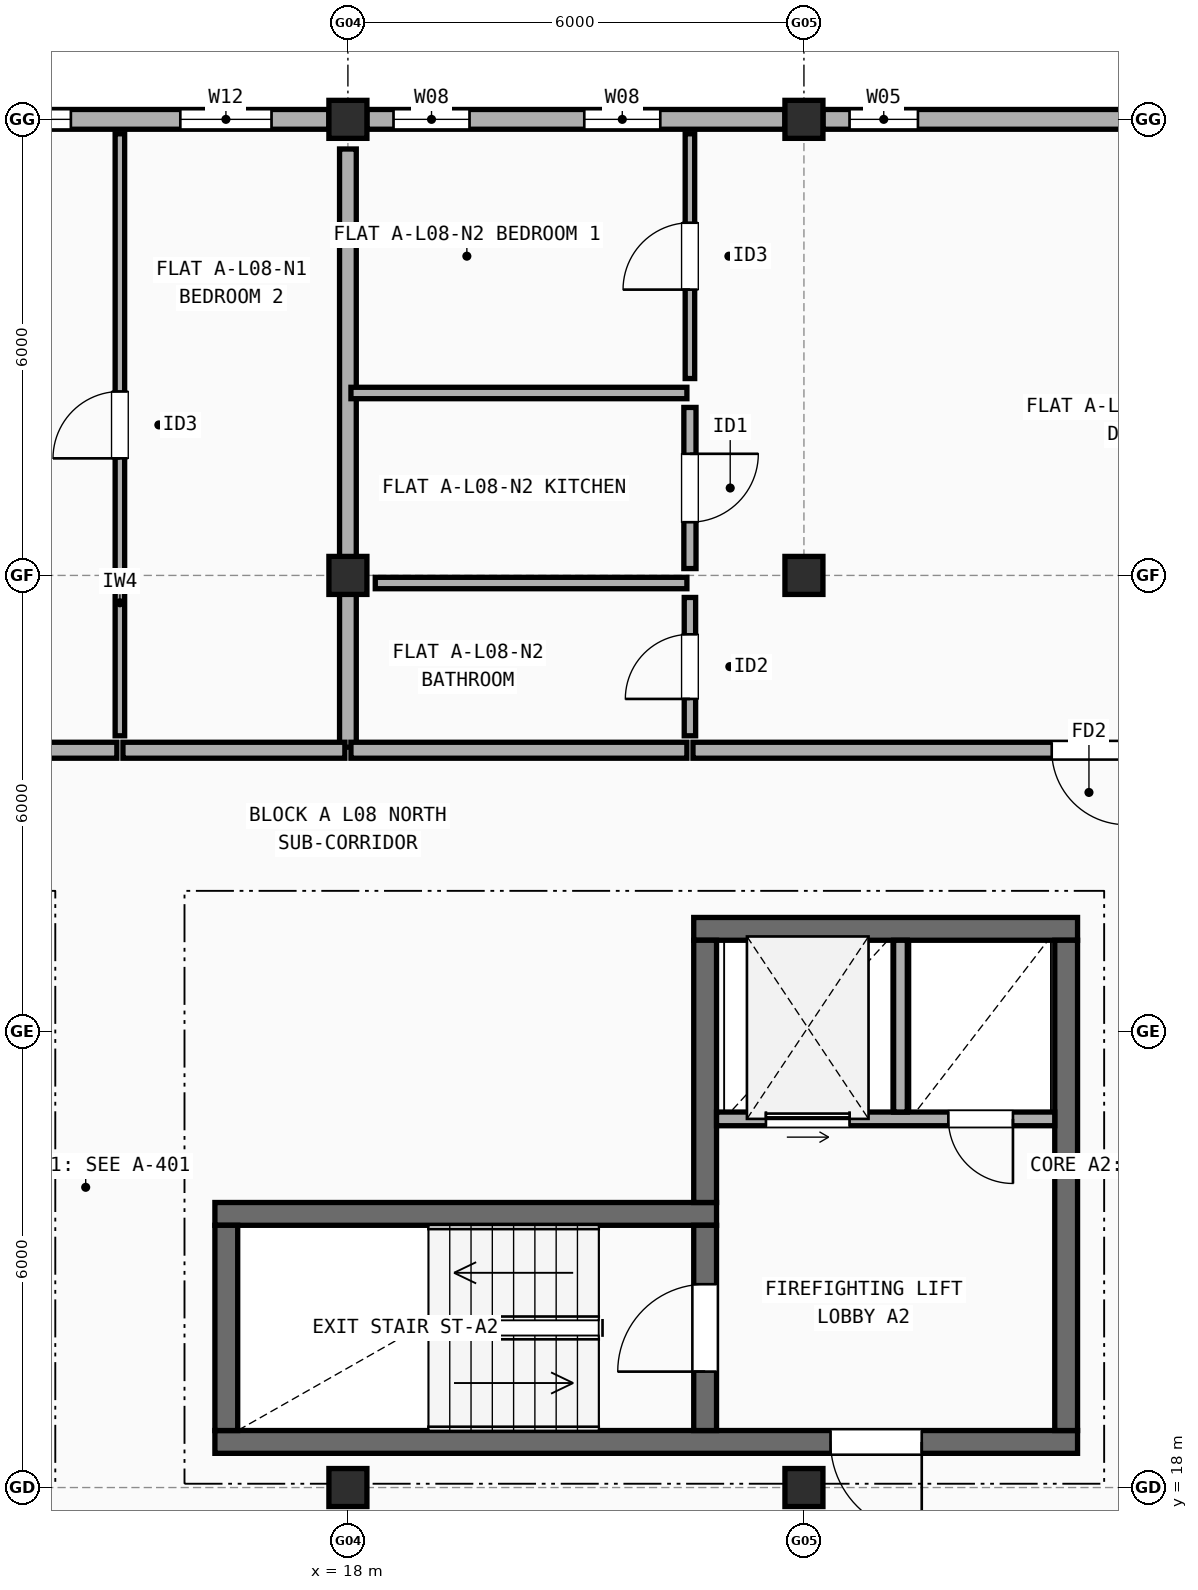
"""IFC4 building model, lengths in metres.
Left out: names, types, materials, properties, quantities, classifications, styles, units other than length and angle.
Written with IfcOpenShell. Run it as: python <this file> out.ifc"""

import sys

from ifc_helpers import new_model, si_unit, direction, frame, frame_2d, origin, origin_2d, place, context, subcontext, project, spatial, rectangle, extrude, element, fill, save


model = new_model("IFC4")
c1 = context("Model", 3, precision=1e-05, world=origin(), true_north=direction((0.0, 1.0)))
c2 = subcontext(c1, "Body", "Model", "MODEL_VIEW")
j1 = project(units=[si_unit("LENGTHUNIT", "METRE"), si_unit("PLANEANGLEUNIT", "RADIAN")], contexts=[c1])
p1 = place(None, origin())
s1 = spatial("IfcSite", under=j1, at=p1, CompositionType="ELEMENT")
p2 = place(p1, origin())
s2 = spatial("IfcBuilding", under=s1, at=p2, CompositionType="ELEMENT")
p3 = place(p2, frame((0.0, 0.0, 26.9)))
s3 = spatial("IfcBuildingStorey", under=s2, at=p3, CompositionType="ELEMENT", Elevation=26.9)
for number, where, z_axis, x_axis in (
    (1, (18.0, 18.0, 0.0), (0.0, 0.0, 1.0), (1.0, 0.0, 0.0)),
    (2, (18.0, 30.0, 0.0), (0.0, 0.0, 1.0), (1.0, 0.0, 0.0)),
    (3, (18.0, 36.0, 0.0), (0.0, 0.0, 1.0), (1.0, 0.0, 0.0)),
    (4, (24.0, 18.0, 0.0), (0.0, 0.0, 1.0), (1.0, 0.0, 0.0)),
    (5, (24.0, 30.0, 0.0), (0.0, 0.0, 1.0), (1.0, 0.0, 0.0)),
    (6, (24.0, 36.0, 0.0), (0.0, 0.0, 1.0), (1.0, 0.0, 0.0)),
):
    element("IfcColumn", number, at=place(p3, frame(where, z_axis=z_axis, x_axis=x_axis)), inside=s3, PredefinedType="COLUMN", context=c2, shape_type="SweptSolid", body=[
        extrude(rectangle(XDim=0.5, YDim=0.5, at=origin_2d()), origin(), (0.0, 0.0, 1.0), 2.98),
    ])
p4 = place(p3, frame((29.775, 36.0, 0.0), z_axis=(0.0, 0.0, 1.0), x_axis=(-1.0, 0.0, 0.0)))
e7 = element("IfcWall", 7, at=p4, inside=s3, PredefinedType="STANDARD", context=c2, shape_type="SweptSolid", body=[
    extrude(rectangle(XDim=5.525, YDim=0.26, at=frame_2d((2.762, 0.0))), origin(), (0.0, 0.0, 1.0), 2.462),
])
p5 = place(p4, frame((0.35, 0.0, 0.9)))
e8 = element("IfcOpeningElement", 8, at=p5, cuts=e7, PredefinedType="OPENING", context=c2, shape_type="SweptSolid", body=[
    extrude(rectangle(XDim=0.9, YDim=1.4, at=frame_2d((0.45, 0.7))), frame((0.0, 0.14, 0.0), z_axis=(0.0, -1.0, 0.0), x_axis=(1.0, 0.0, 0.0)), (0.0, 0.0, 1.0), 0.28),
])
p6 = place(p4, frame((4.275, 0.0, 0.9)))
e9 = element("IfcOpeningElement", 9, at=p6, cuts=e7, PredefinedType="OPENING", context=c2, shape_type="SweptSolid", body=[
    extrude(rectangle(XDim=0.9, YDim=1.4, at=frame_2d((0.45, 0.7))), frame((0.0, 0.14, 0.0), z_axis=(0.0, -1.0, 0.0), x_axis=(1.0, 0.0, 0.0)), (0.0, 0.0, 1.0), 0.28),
])
p7 = place(p3, frame((23.75, 36.0, 0.0), z_axis=(0.0, 0.0, 1.0), x_axis=(-1.0, 0.0, 0.0)))
e10 = element("IfcWall", 10, at=p7, inside=s3, PredefinedType="STANDARD", context=c2, shape_type="SweptSolid", body=[
    extrude(rectangle(XDim=5.5, YDim=0.26, at=frame_2d((2.75, 0.0))), origin(), (0.0, 0.0, 1.0), 2.462),
])
p8 = place(p7, frame((1.64, 0.0, 0.9)))
e11 = element("IfcOpeningElement", 11, at=p8, cuts=e10, PredefinedType="OPENING", context=c2, shape_type="SweptSolid", body=[
    extrude(rectangle(XDim=1.0, YDim=1.4, at=frame_2d((0.5, 0.7))), frame((0.0, 0.14, 0.0), z_axis=(0.0, -1.0, 0.0), x_axis=(1.0, 0.0, 0.0)), (0.0, 0.0, 1.0), 0.28),
])
p9 = place(p7, frame((4.15, 0.0, 0.9)))
e12 = element("IfcOpeningElement", 12, at=p9, cuts=e10, PredefinedType="OPENING", context=c2, shape_type="SweptSolid", body=[
    extrude(rectangle(XDim=1.0, YDim=1.4, at=frame_2d((0.5, 0.7))), frame((0.0, 0.14, 0.0), z_axis=(0.0, -1.0, 0.0), x_axis=(1.0, 0.0, 0.0)), (0.0, 0.0, 1.0), 0.28),
])
p10 = place(p3, frame((17.75, 36.0, 0.0), z_axis=(0.0, 0.0, 1.0), x_axis=(-1.0, 0.0, 0.0)))
e13 = element("IfcWall", 13, at=p10, inside=s3, PredefinedType="STANDARD", context=c2, shape_type="SweptSolid", body=[
    extrude(rectangle(XDim=5.5, YDim=0.26, at=frame_2d((2.75, 0.0))), origin(), (0.0, 0.0, 1.0), 2.462),
])
p11 = place(p10, frame((0.755, 0.0, 0.9)))
e14 = element("IfcOpeningElement", 14, at=p11, cuts=e13, PredefinedType="OPENING", context=c2, shape_type="SweptSolid", body=[
    extrude(rectangle(XDim=1.2, YDim=1.35, at=frame_2d((0.6, 0.675))), frame((0.0, 0.14, 0.0), z_axis=(0.0, -1.0, 0.0), x_axis=(1.0, 0.0, 0.0)), (0.0, 0.0, 1.0), 0.28),
])
p12 = place(p10, frame((3.395, 0.0, 0.9)))
e15 = element("IfcOpeningElement", 15, at=p12, cuts=e13, PredefinedType="OPENING", context=c2, shape_type="SweptSolid", body=[
    extrude(rectangle(XDim=1.5, YDim=1.4, at=frame_2d((0.75, 0.7))), frame((0.0, 0.14, 0.0), z_axis=(0.0, -1.0, 0.0), x_axis=(1.0, 0.0, 0.0)), (0.0, 0.0, 1.0), 0.28),
])
p13 = place(p3, frame((16.25, 18.6, 0.0), z_axis=(0.0, 0.0, 1.0), x_axis=(1.0, 0.0, 0.0)))
e16 = element("IfcWall", 16, at=p13, inside=s3, PredefinedType="SHEAR", context=c2, shape_type="SweptSolid", body=[
    extrude(rectangle(XDim=11.35, YDim=0.3, at=frame_2d((5.675, 0.0))), origin(), (0.0, 0.0, 1.0), 2.98),
])
p14 = place(p13, frame((8.1, 0.0, 0.0)))
e17 = element("IfcOpeningElement", 17, at=p14, cuts=e16, PredefinedType="OPENING", context=c2, shape_type="SweptSolid", body=[
    extrude(rectangle(XDim=1.2, YDim=2.15, at=frame_2d((0.6, 1.075))), frame((0.0, 0.16, 0.0), z_axis=(0.0, -1.0, 0.0), x_axis=(1.0, 0.0, 0.0)), (0.0, 0.0, 1.0), 0.32),
])
p15 = place(p3, frame((22.85, 21.6, 0.0), z_axis=(0.0, 0.0, 1.0), x_axis=(-1.0, 0.0, 0.0)))
e18 = element("IfcWall", 18, at=p15, inside=s3, PredefinedType="SHEAR", context=c2, shape_type="SweptSolid", body=[
    extrude(rectangle(XDim=6.6, YDim=0.3, at=frame_2d((3.3, 0.0))), origin(), (0.0, 0.0, 1.0), 2.98),
])
p16 = place(p3, frame((16.4, 21.45, 0.0), z_axis=(0.0, 0.0, 1.0), x_axis=(0.0, -1.0, 0.0)))
e19 = element("IfcWall", 19, at=p16, inside=s3, PredefinedType="SHEAR", context=c2, shape_type="SweptSolid", body=[
    extrude(rectangle(XDim=2.7, YDim=0.3, at=frame_2d((1.35, 0.0))), origin(), (0.0, 0.0, 1.0), 2.98),
])
p17 = place(p3, frame((22.7, 18.75, 0.0), z_axis=(0.0, 0.0, 1.0), x_axis=(0.0, 1.0, 0.0)))
e20 = element("IfcWall", 20, at=p17, inside=s3, PredefinedType="SHEAR", context=c2, shape_type="SweptSolid", body=[
    extrude(rectangle(XDim=2.7, YDim=0.3, at=frame_2d((1.35, 0.0))), origin(), (0.0, 0.0, 1.0), 2.98),
])
p18 = place(p17, frame((0.775, 0.0, 0.0)))
e21 = element("IfcOpeningElement", 21, at=p18, cuts=e20, PredefinedType="OPENING", context=c2, shape_type="SweptSolid", body=[
    extrude(rectangle(XDim=1.15, YDim=2.15, at=frame_2d((0.575, 1.075))), frame((0.0, 0.16, 0.0), z_axis=(0.0, -1.0, 0.0), x_axis=(1.0, 0.0, 0.0)), (0.0, 0.0, 1.0), 0.32),
])
p19 = place(p3, frame((27.6, 25.35, 0.0), z_axis=(0.0, 0.0, 1.0), x_axis=(-1.0, 0.0, 0.0)))
e22 = element("IfcWall", 22, at=p19, inside=s3, PredefinedType="SHEAR", context=c2, shape_type="SweptSolid", body=[
    extrude(rectangle(XDim=5.05, YDim=0.3, at=frame_2d((2.525, 0.0))), origin(), (0.0, 0.0, 1.0), 2.98),
])
p20 = place(p3, frame((27.45, 18.75, 0.0), z_axis=(0.0, 0.0, 1.0), x_axis=(0.0, 1.0, 0.0)))
e23 = element("IfcWall", 23, at=p20, inside=s3, PredefinedType="SHEAR", context=c2, shape_type="SweptSolid", body=[
    extrude(rectangle(XDim=6.45, YDim=0.3, at=frame_2d((3.225, 0.0))), origin(), (0.0, 0.0, 1.0), 2.98),
])
p21 = place(p3, frame((22.7, 21.75, 0.0), z_axis=(0.0, 0.0, 1.0), x_axis=(0.0, 1.0, 0.0)))
e24 = element("IfcWall", 24, at=p21, inside=s3, PredefinedType="SHEAR", context=c2, shape_type="SweptSolid", body=[
    extrude(rectangle(XDim=3.45, YDim=0.3, at=frame_2d((1.725, 0.0))), origin(), (0.0, 0.0, 1.0), 2.98),
])
p22 = place(p3, frame((22.85, 22.85, 0.0), z_axis=(0.0, 0.0, 1.0), x_axis=(1.0, 0.0, 0.0)))
e25 = element("IfcWall", 25, at=p22, inside=s3, PredefinedType="SOLIDWALL", context=c2, shape_type="SweptSolid", body=[
    extrude(rectangle(XDim=4.45, YDim=0.18, at=frame_2d((2.225, 0.0))), origin(), (0.0, 0.0, 1.0), 2.98),
])
p23 = place(p22, frame((0.65, 0.0, 0.0)))
e26 = element("IfcOpeningElement", 26, at=p23, cuts=e25, PredefinedType="OPENING", context=c2, shape_type="SweptSolid", body=[
    extrude(rectangle(XDim=1.1, YDim=2.15, at=frame_2d((0.55, 1.075))), frame((0.0, 0.1, 0.0), z_axis=(0.0, -1.0, 0.0), x_axis=(1.0, 0.0, 0.0)), (0.0, 0.0, 1.0), 0.2),
])
p24 = place(p22, frame((3.05, 0.0, 0.0)))
e27 = element("IfcOpeningElement", 27, at=p24, cuts=e25, PredefinedType="OPENING", context=c2, shape_type="SweptSolid", body=[
    extrude(rectangle(XDim=0.85, YDim=2.1, at=frame_2d((0.425, 1.05))), frame((0.0, 0.1, 0.0), z_axis=(0.0, -1.0, 0.0), x_axis=(1.0, 0.0, 0.0)), (0.0, 0.0, 1.0), 0.2),
])
p25 = place(p3, frame((25.27, 22.94, 0.0), z_axis=(0.0, 0.0, 1.0), x_axis=(0.0, 1.0, 0.0)))
e28 = element("IfcWall", 28, at=p25, inside=s3, PredefinedType="SOLIDWALL", context=c2, shape_type="SweptSolid", body=[
    extrude(rectangle(XDim=2.26, YDim=0.18, at=frame_2d((1.13, 0.0))), origin(), (0.0, 0.0, 1.0), 2.98),
])
p26 = place(p3, frame((18.0, 27.74, 0.0), z_axis=(0.0, 0.0, 1.0), x_axis=(0.0, 1.0, 0.0)))
e29 = element("IfcWall", 29, at=p26, inside=s3, PredefinedType="SOLIDWALL", context=c2, shape_type="SweptSolid", body=[
    extrude(rectangle(XDim=7.87, YDim=0.22, at=frame_2d((3.935, 0.0))), origin(), (0.0, 0.0, 1.0), 2.458),
])
p27 = place(p3, frame((4.54, 27.7, 0.0), z_axis=(0.0, 0.0, 1.0), x_axis=(1.0, 0.0, 0.0)))
e30 = element("IfcWall", 30, at=p27, inside=s3, PredefinedType="SOLIDWALL", context=c2, shape_type="SweptSolid", body=[
    extrude(rectangle(XDim=10.42, YDim=0.21, at=frame_2d((5.21, 0.0))), origin(), (0.0, 0.0, 1.0), 2.508),
])
p28 = place(p27, frame((4.685, 0.0, 0.0)))
e31 = element("IfcOpeningElement", 31, at=p28, cuts=e30, PredefinedType="OPENING", context=c2, shape_type="SweptSolid", body=[
    extrude(rectangle(XDim=1.05, YDim=2.15, at=frame_2d((0.525, 1.075))), frame((0.0, 0.115, 0.0), z_axis=(0.0, -1.0, 0.0), x_axis=(1.0, 0.0, 0.0)), (0.0, 0.0, 1.0), 0.23),
])
p29 = place(p3, frame((15.04, 27.7, 0.0), z_axis=(0.0, 0.0, 1.0), x_axis=(1.0, 0.0, 0.0)))
e32 = element("IfcWall", 32, at=p29, inside=s3, PredefinedType="SOLIDWALL", context=c2, shape_type="SweptSolid", body=[
    extrude(rectangle(XDim=2.92, YDim=0.21, at=frame_2d((1.46, 0.0))), origin(), (0.0, 0.0, 1.0), 2.98),
])
p30 = place(p3, frame((15.0, 27.89, 0.0), z_axis=(0.0, 0.0, 1.0), x_axis=(0.0, 1.0, 0.0)))
e33 = element("IfcWall", 33, at=p30, inside=s3, PredefinedType="PARTITIONING", context=c2, shape_type="SweptSolid", body=[
    extrude(rectangle(XDim=7.92, YDim=0.125, at=frame_2d((3.96, 0.0))), origin(), (0.0, 0.0, 1.0), 2.462),
])
p31 = place(p30, frame((3.65, 0.0, 0.0)))
e34 = element("IfcOpeningElement", 34, at=p31, cuts=e33, PredefinedType="OPENING", context=c2, shape_type="SweptSolid", body=[
    extrude(rectangle(XDim=0.88, YDim=2.1, at=frame_2d((0.44, 1.05))), frame((0.0, 0.073, 0.0), z_axis=(0.0, -1.0, 0.0), x_axis=(1.0, 0.0, 0.0)), (0.0, 0.0, 1.0), 0.145),
])
p32 = place(p3, frame((18.04, 27.7, 0.0), z_axis=(0.0, 0.0, 1.0), x_axis=(1.0, 0.0, 0.0)))
e35 = element("IfcWall", 35, at=p32, inside=s3, PredefinedType="SOLIDWALL", context=c2, shape_type="SweptSolid", body=[
    extrude(rectangle(XDim=4.42, YDim=0.21, at=frame_2d((2.21, 0.0))), origin(), (0.0, 0.0, 1.0), 2.98),
])
p33 = place(p3, frame((22.54, 27.7, 0.0), z_axis=(0.0, 0.0, 1.0), x_axis=(1.0, 0.0, 0.0)))
e36 = element("IfcWall", 36, at=p33, inside=s3, PredefinedType="SOLIDWALL", context=c2, shape_type="SweptSolid", body=[
    extrude(rectangle(XDim=10.42, YDim=0.21, at=frame_2d((5.21, 0.0))), origin(), (0.0, 0.0, 1.0), 2.462),
])
p34 = place(p33, frame((4.72, 0.0, 0.0)))
e37 = element("IfcOpeningElement", 37, at=p34, cuts=e36, PredefinedType="OPENING", context=c2, shape_type="SweptSolid", body=[
    extrude(rectangle(XDim=0.98, YDim=2.15, at=frame_2d((0.49, 1.075))), frame((0.0, 0.115, 0.0), z_axis=(0.0, -1.0, 0.0), x_axis=(1.0, 0.0, 0.0)), (0.0, 0.0, 1.0), 0.23),
])
p35 = place(p3, frame((22.5, 32.59, 0.0), z_axis=(0.0, 0.0, 1.0), x_axis=(0.0, 1.0, 0.0)))
e38 = element("IfcWall", 38, at=p35, inside=s3, PredefinedType="PARTITIONING", context=c2, shape_type="SweptSolid", body=[
    extrude(rectangle(XDim=3.22, YDim=0.125, at=frame_2d((1.61, 0.0))), origin(), (0.0, 0.0, 1.0), 2.98),
])
p36 = place(p35, frame((1.17, 0.0, 0.0)))
e39 = element("IfcOpeningElement", 39, at=p36, cuts=e38, PredefinedType="OPENING", context=c2, shape_type="SweptSolid", body=[
    extrude(rectangle(XDim=0.88, YDim=2.1, at=frame_2d((0.44, 1.05))), frame((0.0, 0.073, 0.0), z_axis=(0.0, -1.0, 0.0), x_axis=(1.0, 0.0, 0.0)), (0.0, 0.0, 1.0), 0.145),
])
p37 = place(p3, frame((22.5, 30.09, 0.0), z_axis=(0.0, 0.0, 1.0), x_axis=(0.0, 1.0, 0.0)))
e40 = element("IfcWall", 40, at=p37, inside=s3, PredefinedType="PLUMBINGWALL", context=c2, shape_type="SweptSolid", body=[
    extrude(rectangle(XDim=2.12, YDim=0.16, at=frame_2d((1.06, 0.0))), origin(), (0.0, 0.0, 1.0), 2.462),
])
p38 = place(p37, frame((0.61, 0.0, 0.0)))
e41 = element("IfcOpeningElement", 41, at=p38, cuts=e40, PredefinedType="OPENING", context=c2, shape_type="SweptSolid", body=[
    extrude(rectangle(XDim=0.9, YDim=2.1, at=frame_2d((0.45, 1.05))), frame((0.0, 0.09, 0.0), z_axis=(0.0, -1.0, 0.0), x_axis=(1.0, 0.0, 0.0)), (0.0, 0.0, 1.0), 0.18),
])
p39 = place(p3, frame((22.5, 27.89, 0.0), z_axis=(0.0, 0.0, 1.0), x_axis=(0.0, 1.0, 0.0)))
e42 = element("IfcWall", 42, at=p39, inside=s3, PredefinedType="PARTITIONING", context=c2, shape_type="SweptSolid", body=[
    extrude(rectangle(XDim=1.82, YDim=0.15, at=frame_2d((0.91, 0.0))), origin(), (0.0, 0.0, 1.0), 2.98),
])
p40 = place(p39, frame((0.485, 0.0, 0.0)))
e43 = element("IfcOpeningElement", 43, at=p40, cuts=e42, PredefinedType="OPENING", context=c2, shape_type="SweptSolid", body=[
    extrude(rectangle(XDim=0.85, YDim=2.1, at=frame_2d((0.425, 1.05))), frame((0.0, 0.085, 0.0), z_axis=(0.0, -1.0, 0.0), x_axis=(1.0, 0.0, 0.0)), (0.0, 0.0, 1.0), 0.17),
])
p41 = place(p3, frame((18.04, 32.4, 0.0), z_axis=(0.0, 0.0, 1.0), x_axis=(1.0, 0.0, 0.0)))
e44 = element("IfcWall", 44, at=p41, inside=s3, PredefinedType="PARTITIONING", context=c2, shape_type="SweptSolid", body=[
    extrude(rectangle(XDim=4.42, YDim=0.15, at=frame_2d((2.21, 0.0))), origin(), (0.0, 0.0, 1.0), 2.458),
])
p42 = place(p3, frame((18.36, 29.9, 0.0), z_axis=(0.0, 0.0, 1.0), x_axis=(1.0, 0.0, 0.0)))
e45 = element("IfcWall", 45, at=p42, inside=s3, PredefinedType="PARTITIONING", context=c2, shape_type="SweptSolid", body=[
    extrude(rectangle(XDim=4.1, YDim=0.15, at=frame_2d((2.05, 0.0))), origin(), (0.0, 0.0, 1.0), 2.462),
])
p43 = place(p6, origin())
e46 = element("IfcWindow", 46, at=p43, inside=s3, PartitioningType="SINGLE_PANEL", PredefinedType="WINDOW", context=c2, shape_type="SweptSolid", body=[
    extrude(rectangle(XDim=0.9, YDim=1.4, at=frame_2d((0.45, 0.7))), frame((0.0, 0.03, 0.0), z_axis=(0.0, -1.0, 0.0), x_axis=(1.0, 0.0, 0.0)), (0.0, 0.0, 1.0), 0.06),
])
fill(e9, e46)
p44 = place(p8, origin())
e47 = element("IfcWindow", 47, at=p44, inside=s3, PartitioningType="SINGLE_PANEL", PredefinedType="WINDOW", context=c2, shape_type="SweptSolid", body=[
    extrude(rectangle(XDim=1.0, YDim=1.4, at=frame_2d((0.5, 0.7))), frame((0.0, 0.03, 0.0), z_axis=(0.0, -1.0, 0.0), x_axis=(1.0, 0.0, 0.0)), (0.0, 0.0, 1.0), 0.06),
])
fill(e11, e47)
p45 = place(p9, origin())
e48 = element("IfcWindow", 48, at=p45, inside=s3, PartitioningType="SINGLE_PANEL", PredefinedType="WINDOW", context=c2, shape_type="SweptSolid", body=[
    extrude(rectangle(XDim=1.0, YDim=1.4, at=frame_2d((0.5, 0.7))), frame((0.0, 0.03, 0.0), z_axis=(0.0, -1.0, 0.0), x_axis=(1.0, 0.0, 0.0)), (0.0, 0.0, 1.0), 0.06),
])
fill(e12, e48)
p46 = place(p11, origin())
e49 = element("IfcWindow", 49, at=p46, inside=s3, PartitioningType="SINGLE_PANEL", PredefinedType="WINDOW", context=c2, shape_type="SweptSolid", body=[
    extrude(rectangle(XDim=1.2, YDim=1.35, at=frame_2d((0.6, 0.675))), frame((0.0, 0.03, 0.0), z_axis=(0.0, -1.0, 0.0), x_axis=(1.0, 0.0, 0.0)), (0.0, 0.0, 1.0), 0.06),
])
fill(e14, e49)
p47 = place(p12, origin())
e50 = element("IfcWindow", 50, at=p47, inside=s3, PartitioningType="SINGLE_PANEL", PredefinedType="WINDOW", context=c2, shape_type="SweptSolid", body=[
    extrude(rectangle(XDim=1.5, YDim=1.4, at=frame_2d((0.75, 0.7))), frame((0.0, 0.03, 0.0), z_axis=(0.0, -1.0, 0.0), x_axis=(1.0, 0.0, 0.0)), (0.0, 0.0, 1.0), 0.06),
])
fill(e15, e50)
p48 = place(p14, origin())
e51 = element("IfcDoor", 51, at=p48, inside=s3, OperationType="SINGLE_SWING_RIGHT", PredefinedType="DOOR", context=c2, shape_type="SweptSolid", body=[
    extrude(rectangle(XDim=1.2, YDim=2.15, at=frame_2d((0.6, 1.075))), frame((0.0, 0.025, 0.0), z_axis=(0.0, -1.0, 0.0), x_axis=(1.0, 0.0, 0.0)), (0.0, 0.0, 1.0), 0.05),
])
fill(e17, e51)
p49 = place(p18, origin())
e52 = element("IfcDoor", 52, at=p49, inside=s3, OperationType="SINGLE_SWING_LEFT", PredefinedType="DOOR", context=c2, shape_type="SweptSolid", body=[
    extrude(rectangle(XDim=1.15, YDim=2.15, at=frame_2d((0.575, 1.075))), frame((0.0, 0.025, 0.0), z_axis=(0.0, -1.0, 0.0), x_axis=(1.0, 0.0, 0.0)), (0.0, 0.0, 1.0), 0.05),
])
fill(e21, e52)
p50 = place(p23, origin())
e53 = element("IfcDoor", 53, at=p50, inside=s3, OperationType="SLIDING_TO_LEFT", PredefinedType="DOOR", context=c2, shape_type="SweptSolid", body=[
    extrude(rectangle(XDim=1.1, YDim=2.15, at=frame_2d((0.55, 1.075))), frame((0.0, 0.025, 0.0), z_axis=(0.0, -1.0, 0.0), x_axis=(1.0, 0.0, 0.0)), (0.0, 0.0, 1.0), 0.05),
])
fill(e26, e53)
p51 = place(p24, frame((0.85, 0.0, 0.0), z_axis=(0.0, 0.0, 1.0), x_axis=(-1.0, 0.0, 0.0)))
e54 = element("IfcDoor", 54, at=p51, inside=s3, OperationType="SINGLE_SWING_RIGHT", PredefinedType="DOOR", context=c2, shape_type="SweptSolid", body=[
    extrude(rectangle(XDim=0.85, YDim=2.1, at=frame_2d((0.425, 1.05))), frame((0.0, 0.025, 0.0), z_axis=(0.0, -1.0, 0.0), x_axis=(1.0, 0.0, 0.0)), (0.0, 0.0, 1.0), 0.05),
])
fill(e27, e54)
p52 = place(p31, origin())
e55 = element("IfcDoor", 55, at=p52, inside=s3, OperationType="SINGLE_SWING_LEFT", PredefinedType="DOOR", context=c2, shape_type="SweptSolid", body=[
    extrude(rectangle(XDim=0.88, YDim=2.1, at=frame_2d((0.44, 1.05))), frame((0.0, 0.025, 0.0), z_axis=(0.0, -1.0, 0.0), x_axis=(1.0, 0.0, 0.0)), (0.0, 0.0, 1.0), 0.05),
])
fill(e34, e55)
p53 = place(p34, origin())
e56 = element("IfcDoor", 56, at=p53, inside=s3, OperationType="SINGLE_SWING_RIGHT", PredefinedType="DOOR", context=c2, shape_type="SweptSolid", body=[
    extrude(rectangle(XDim=0.98, YDim=2.15, at=frame_2d((0.49, 1.075))), frame((0.0, 0.025, 0.0), z_axis=(0.0, -1.0, 0.0), x_axis=(1.0, 0.0, 0.0)), (0.0, 0.0, 1.0), 0.05),
])
fill(e37, e56)
p54 = place(p36, origin())
e57 = element("IfcDoor", 57, at=p54, inside=s3, OperationType="SINGLE_SWING_LEFT", PredefinedType="DOOR", context=c2, shape_type="SweptSolid", body=[
    extrude(rectangle(XDim=0.88, YDim=2.1, at=frame_2d((0.44, 1.05))), frame((0.0, 0.025, 0.0), z_axis=(0.0, -1.0, 0.0), x_axis=(1.0, 0.0, 0.0)), (0.0, 0.0, 1.0), 0.05),
])
fill(e39, e57)
p55 = place(p38, origin())
e58 = element("IfcDoor", 58, at=p55, inside=s3, OperationType="SINGLE_SWING_RIGHT", PredefinedType="DOOR", context=c2, shape_type="SweptSolid", body=[
    extrude(rectangle(XDim=0.9, YDim=2.1, at=frame_2d((0.45, 1.05))), frame((0.0, 0.025, 0.0), z_axis=(0.0, -1.0, 0.0), x_axis=(1.0, 0.0, 0.0)), (0.0, 0.0, 1.0), 0.05),
])
fill(e41, e58)
p56 = place(p40, origin())
e59 = element("IfcDoor", 59, at=p56, inside=s3, OperationType="SINGLE_SWING_LEFT", PredefinedType="DOOR", context=c2, shape_type="SweptSolid", body=[
    extrude(rectangle(XDim=0.85, YDim=2.1, at=frame_2d((0.425, 1.05))), frame((0.0, 0.025, 0.0), z_axis=(0.0, -1.0, 0.0), x_axis=(1.0, 0.0, 0.0)), (0.0, 0.0, 1.0), 0.05),
])
fill(e43, e59)
save(model, sys.argv[1])
